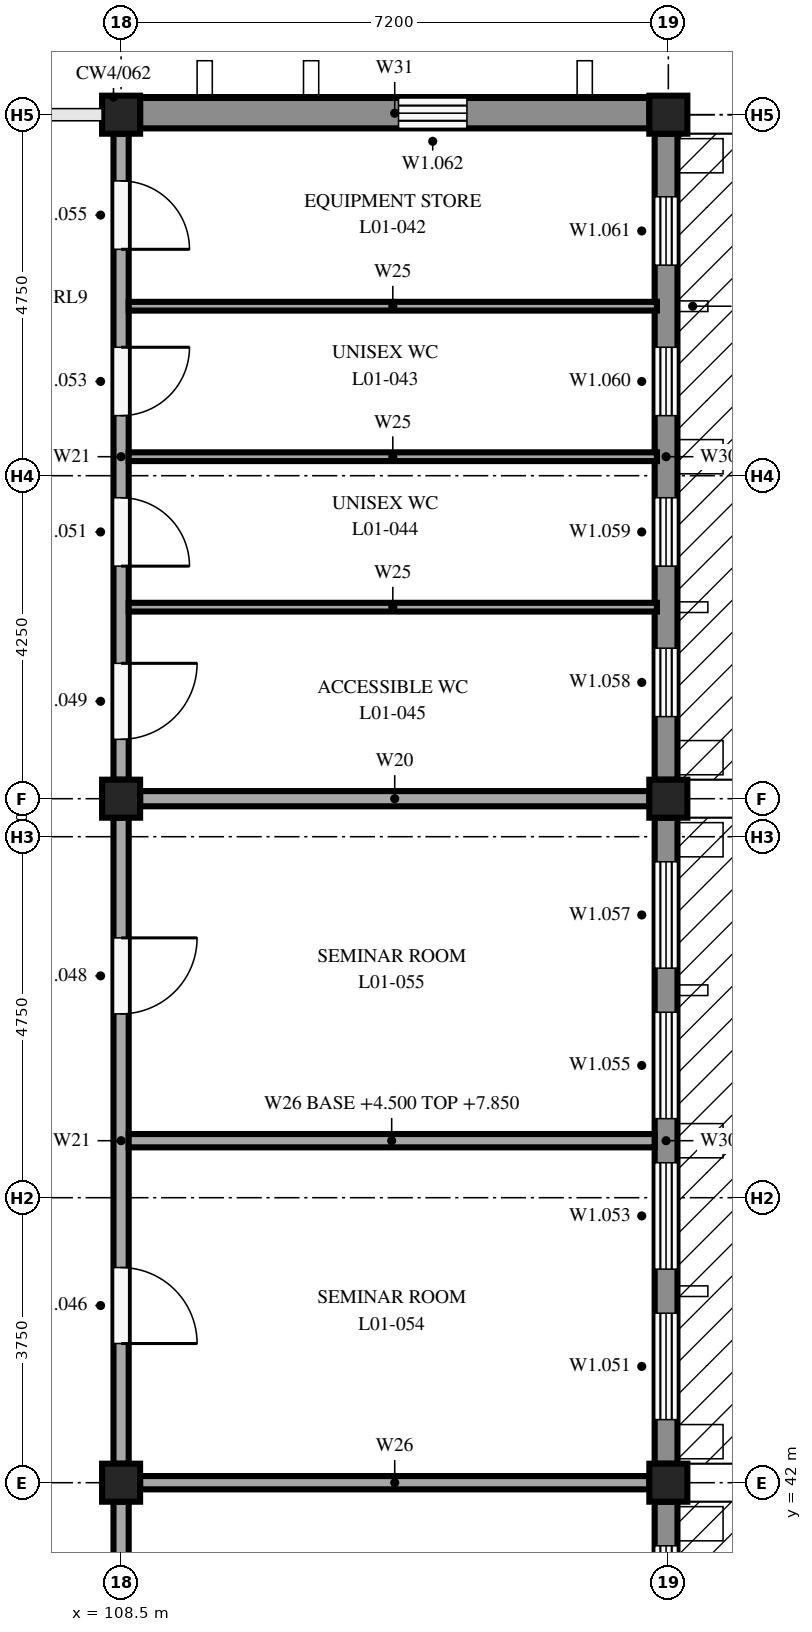
"""IFC4 building model, lengths in metres.
Left out: names, types, materials, properties, quantities, classifications, styles, units other than length and angle.
Written with IfcOpenShell. Run it as: python <this file> out.ifc"""

import sys

from ifc_helpers import new_model, si_unit, direction, frame, frame_2d, origin, origin_2d, place, context, subcontext, project, spatial, rectangle, extrude, element, fill, save


model = new_model("IFC4")
c1 = context("Model", 3, precision=1e-05, world=origin(), true_north=direction((0.0, 1.0)))
c2 = subcontext(c1, "Body", "Model", "MODEL_VIEW")
j1 = project(units=[si_unit("LENGTHUNIT", "METRE"), si_unit("PLANEANGLEUNIT", "RADIAN")], contexts=[c1])
p1 = place(None, origin())
s1 = spatial("IfcSite", under=j1, at=p1, CompositionType="ELEMENT")
p2 = place(p1, origin())
s2 = spatial("IfcBuilding", under=s1, at=p2, CompositionType="ELEMENT")
p3 = place(p2, frame((0.0, 0.0, 4.5)))
s3 = spatial("IfcBuildingStorey", under=s2, at=p3, CompositionType="ELEMENT", Elevation=4.5)
for number, where, z_axis, x_axis in (
    (1, (108.5, 42.0, 0.0), (0.0, 0.0, 1.0), (1.0, 0.0, 0.0)),
    (2, (108.5, 51.0, 0.0), (0.0, 0.0, 1.0), (1.0, 0.0, 0.0)),
    (3, (108.5, 60.0, 0.0), (0.0, 0.0, 1.0), (1.0, 0.0, 0.0)),
    (4, (115.7, 42.0, 0.0), (0.0, 0.0, 1.0), (1.0, 0.0, 0.0)),
    (5, (115.7, 51.0, 0.0), (0.0, 0.0, 1.0), (1.0, 0.0, 0.0)),
    (6, (115.7, 60.0, 0.0), (0.0, 0.0, 1.0), (1.0, 0.0, 0.0)),
):
    element("IfcColumn", number, at=place(p3, frame(where, z_axis=z_axis, x_axis=x_axis)), inside=s3, PredefinedType="COLUMN", context=c2, shape_type="SweptSolid", body=[
        extrude(rectangle(XDim=0.5, YDim=0.5, at=origin_2d()), origin(), (0.0, 0.0, 1.0), 3.35),
    ])
p4 = place(p3, frame((115.67, 41.75, 0.0), z_axis=(0.0, 0.0, 1.0), x_axis=(0.0, -1.0, 0.0)))
e7 = element("IfcWall", 7, at=p4, inside=s3, PredefinedType="STANDARD", context=c2, shape_type="SweptSolid", body=[
    extrude(rectangle(XDim=8.5, YDim=0.3, at=frame_2d((4.25, 0.0))), origin(), (0.0, 0.0, 1.0), 2.85),
])
p5 = place(p4, frame((6.52, 0.0, 0.6)))
e8 = element("IfcOpeningElement", 8, at=p5, cuts=e7, PredefinedType="OPENING", context=c2, shape_type="SweptSolid", body=[
    extrude(rectangle(XDim=1.4, YDim=2.2, at=frame_2d((0.7, 1.1))), frame((0.0, 0.16, 0.0), z_axis=(0.0, -1.0, 0.0), x_axis=(1.0, 0.0, 0.0)), (0.0, 0.0, 1.0), 0.32),
])
p6 = place(p4, frame((4.54, 0.0, 0.6)))
e9 = element("IfcOpeningElement", 9, at=p6, cuts=e7, PredefinedType="OPENING", context=c2, shape_type="SweptSolid", body=[
    extrude(rectangle(XDim=1.4, YDim=2.2, at=frame_2d((0.7, 1.1))), frame((0.0, 0.16, 0.0), z_axis=(0.0, -1.0, 0.0), x_axis=(1.0, 0.0, 0.0)), (0.0, 0.0, 1.0), 0.32),
])
p7 = place(p4, frame((2.56, 0.0, 0.6)))
e10 = element("IfcOpeningElement", 10, at=p7, cuts=e7, PredefinedType="OPENING", context=c2, shape_type="SweptSolid", body=[
    extrude(rectangle(XDim=1.4, YDim=2.2, at=frame_2d((0.7, 1.1))), frame((0.0, 0.16, 0.0), z_axis=(0.0, -1.0, 0.0), x_axis=(1.0, 0.0, 0.0)), (0.0, 0.0, 1.0), 0.32),
])
p8 = place(p4, frame((0.58, 0.0, 0.6)))
e11 = element("IfcOpeningElement", 11, at=p8, cuts=e7, PredefinedType="OPENING", context=c2, shape_type="SweptSolid", body=[
    extrude(rectangle(XDim=1.4, YDim=2.2, at=frame_2d((0.7, 1.1))), frame((0.0, 0.16, 0.0), z_axis=(0.0, -1.0, 0.0), x_axis=(1.0, 0.0, 0.0)), (0.0, 0.0, 1.0), 0.32),
])
p9 = place(p3, frame((115.67, 50.75, 0.0), z_axis=(0.0, 0.0, 1.0), x_axis=(0.0, -1.0, 0.0)))
e12 = element("IfcWall", 12, at=p9, inside=s3, PredefinedType="STANDARD", context=c2, shape_type="SweptSolid", body=[
    extrude(rectangle(XDim=8.5, YDim=0.3, at=frame_2d((4.25, 0.0))), origin(), (0.0, 0.0, 1.0), 2.85),
])
p10 = place(p9, frame((6.52, 0.0, 0.6)))
e13 = element("IfcOpeningElement", 13, at=p10, cuts=e12, PredefinedType="OPENING", context=c2, shape_type="SweptSolid", body=[
    extrude(rectangle(XDim=1.4, YDim=2.2, at=frame_2d((0.7, 1.1))), frame((0.0, 0.16, 0.0), z_axis=(0.0, -1.0, 0.0), x_axis=(1.0, 0.0, 0.0)), (0.0, 0.0, 1.0), 0.32),
])
p11 = place(p9, frame((4.54, 0.0, 0.6)))
e14 = element("IfcOpeningElement", 14, at=p11, cuts=e12, PredefinedType="OPENING", context=c2, shape_type="SweptSolid", body=[
    extrude(rectangle(XDim=1.4, YDim=2.2, at=frame_2d((0.7, 1.1))), frame((0.0, 0.16, 0.0), z_axis=(0.0, -1.0, 0.0), x_axis=(1.0, 0.0, 0.0)), (0.0, 0.0, 1.0), 0.32),
])
p12 = place(p9, frame((2.56, 0.0, 0.6)))
e15 = element("IfcOpeningElement", 15, at=p12, cuts=e12, PredefinedType="OPENING", context=c2, shape_type="SweptSolid", body=[
    extrude(rectangle(XDim=1.4, YDim=2.2, at=frame_2d((0.7, 1.1))), frame((0.0, 0.16, 0.0), z_axis=(0.0, -1.0, 0.0), x_axis=(1.0, 0.0, 0.0)), (0.0, 0.0, 1.0), 0.32),
])
p13 = place(p9, frame((0.58, 0.0, 0.6)))
e16 = element("IfcOpeningElement", 16, at=p13, cuts=e12, PredefinedType="OPENING", context=c2, shape_type="SweptSolid", body=[
    extrude(rectangle(XDim=1.4, YDim=2.2, at=frame_2d((0.7, 1.1))), frame((0.0, 0.16, 0.0), z_axis=(0.0, -1.0, 0.0), x_axis=(1.0, 0.0, 0.0)), (0.0, 0.0, 1.0), 0.32),
])
p14 = place(p3, frame((115.67, 59.75, 0.0), z_axis=(0.0, 0.0, 1.0), x_axis=(0.0, -1.0, 0.0)))
e17 = element("IfcWall", 17, at=p14, inside=s3, PredefinedType="STANDARD", context=c2, shape_type="SweptSolid", body=[
    extrude(rectangle(XDim=8.5, YDim=0.3, at=frame_2d((4.25, 0.0))), origin(), (0.0, 0.0, 1.0), 2.85),
])
p15 = place(p14, frame((6.77, 0.0, 1.6)))
e18 = element("IfcOpeningElement", 18, at=p15, cuts=e17, PredefinedType="OPENING", context=c2, shape_type="SweptSolid", body=[
    extrude(rectangle(XDim=0.9, YDim=1.0, at=frame_2d((0.45, 0.5))), frame((0.0, 0.16, 0.0), z_axis=(0.0, -1.0, 0.0), x_axis=(1.0, 0.0, 0.0)), (0.0, 0.0, 1.0), 0.32),
])
p16 = place(p14, frame((4.79, 0.0, 1.6)))
e19 = element("IfcOpeningElement", 19, at=p16, cuts=e17, PredefinedType="OPENING", context=c2, shape_type="SweptSolid", body=[
    extrude(rectangle(XDim=0.9, YDim=1.0, at=frame_2d((0.45, 0.5))), frame((0.0, 0.16, 0.0), z_axis=(0.0, -1.0, 0.0), x_axis=(1.0, 0.0, 0.0)), (0.0, 0.0, 1.0), 0.32),
])
p17 = place(p14, frame((2.81, 0.0, 1.6)))
e20 = element("IfcOpeningElement", 20, at=p17, cuts=e17, PredefinedType="OPENING", context=c2, shape_type="SweptSolid", body=[
    extrude(rectangle(XDim=0.9, YDim=1.0, at=frame_2d((0.45, 0.5))), frame((0.0, 0.16, 0.0), z_axis=(0.0, -1.0, 0.0), x_axis=(1.0, 0.0, 0.0)), (0.0, 0.0, 1.0), 0.32),
])
p18 = place(p14, frame((0.83, 0.0, 1.6)))
e21 = element("IfcOpeningElement", 21, at=p18, cuts=e17, PredefinedType="OPENING", context=c2, shape_type="SweptSolid", body=[
    extrude(rectangle(XDim=0.9, YDim=1.0, at=frame_2d((0.45, 0.5))), frame((0.0, 0.16, 0.0), z_axis=(0.0, -1.0, 0.0), x_axis=(1.0, 0.0, 0.0)), (0.0, 0.0, 1.0), 0.32),
])
p19 = place(p3, frame((108.75, 60.02, 0.0), z_axis=(0.0, 0.0, 1.0), x_axis=(1.0, 0.0, 0.0)))
e22 = element("IfcWall", 22, at=p19, inside=s3, PredefinedType="STANDARD", context=c2, shape_type="SweptSolid", body=[
    extrude(rectangle(XDim=6.7, YDim=0.4, at=frame_2d((3.35, 0.0))), origin(), (0.0, 0.0, 1.0), 2.9),
])
p20 = place(p19, frame((3.4, 0.0, 1.6)))
e23 = element("IfcOpeningElement", 23, at=p20, cuts=e22, PredefinedType="OPENING", context=c2, shape_type="SweptSolid", body=[
    extrude(rectangle(XDim=0.9, YDim=1.0, at=frame_2d((0.45, 0.5))), frame((0.0, 0.21, 0.0), z_axis=(0.0, -1.0, 0.0), x_axis=(1.0, 0.0, 0.0)), (0.0, 0.0, 1.0), 0.42),
])
p21 = place(p3, frame((108.5, 59.75, 0.0), z_axis=(0.0, 0.0, 1.0), x_axis=(0.0, -1.0, 0.0)))
e24 = element("IfcWall", 24, at=p21, inside=s3, PredefinedType="PARTITIONING", context=c2, shape_type="SweptSolid", body=[
    extrude(rectangle(XDim=8.5, YDim=0.2, at=frame_2d((4.25, 0.0))), origin(), (0.0, 0.0, 1.0), 2.9),
])
p22 = place(p21, frame((6.969, 0.0, 0.0)))
e25 = element("IfcOpeningElement", 25, at=p22, cuts=e24, PredefinedType="OPENING", context=c2, shape_type="SweptSolid", body=[
    extrude(rectangle(XDim=1.0, YDim=2.1, at=frame_2d((0.5, 1.05))), frame((0.0, 0.11, 0.0), z_axis=(0.0, -1.0, 0.0), x_axis=(1.0, 0.0, 0.0)), (0.0, 0.0, 1.0), 0.22),
])
p23 = place(p21, frame((4.79, 0.0, 0.0)))
e26 = element("IfcOpeningElement", 26, at=p23, cuts=e24, PredefinedType="OPENING", context=c2, shape_type="SweptSolid", body=[
    extrude(rectangle(XDim=0.9, YDim=2.1, at=frame_2d((0.45, 1.05))), frame((0.0, 0.11, 0.0), z_axis=(0.0, -1.0, 0.0), x_axis=(1.0, 0.0, 0.0)), (0.0, 0.0, 1.0), 0.22),
])
p24 = place(p21, frame((2.81, 0.0, 0.0)))
e27 = element("IfcOpeningElement", 27, at=p24, cuts=e24, PredefinedType="OPENING", context=c2, shape_type="SweptSolid", body=[
    extrude(rectangle(XDim=0.9, YDim=2.1, at=frame_2d((0.45, 1.05))), frame((0.0, 0.11, 0.0), z_axis=(0.0, -1.0, 0.0), x_axis=(1.0, 0.0, 0.0)), (0.0, 0.0, 1.0), 0.22),
])
p25 = place(p21, frame((0.621, 0.0, 0.0)))
e28 = element("IfcOpeningElement", 28, at=p25, cuts=e24, PredefinedType="OPENING", context=c2, shape_type="SweptSolid", body=[
    extrude(rectangle(XDim=0.9, YDim=2.1, at=frame_2d((0.45, 1.05))), frame((0.0, 0.11, 0.0), z_axis=(0.0, -1.0, 0.0), x_axis=(1.0, 0.0, 0.0)), (0.0, 0.0, 1.0), 0.22),
])
p26 = place(p3, frame((108.75, 51.0, 0.0), z_axis=(0.0, 0.0, 1.0), x_axis=(1.0, 0.0, 0.0)))
e29 = element("IfcWall", 29, at=p26, inside=s3, PredefinedType="PARTITIONING", context=c2, shape_type="SweptSolid", body=[
    extrude(rectangle(XDim=6.7, YDim=0.2, at=frame_2d((3.35, 0.0))), origin(), (0.0, 0.0, 1.0), 2.9),
])
for number, where, z_axis, x_axis in (
    (30, (108.6, 57.48, 0.0), (0.0, 0.0, 1.0), (1.0, 0.0, 0.0)),
    (31, (108.6, 55.5, 0.0), (0.0, 0.0, 1.0), (1.0, 0.0, 0.0)),
    (32, (108.6, 53.52, 0.0), (0.0, 0.0, 1.0), (1.0, 0.0, 0.0)),
):
    element("IfcWall", number, at=place(p3, frame(where, z_axis=z_axis, x_axis=x_axis)), inside=s3, PredefinedType="PARTITIONING", context=c2, shape_type="SweptSolid", body=[
        extrude(rectangle(XDim=6.95, YDim=0.115, at=frame_2d((3.475, 0.0))), origin(), (0.0, 0.0, 1.0), 3.35),
    ])
p27 = place(p3, frame((108.5, 41.75, 0.0), z_axis=(0.0, 0.0, 1.0), x_axis=(0.0, -1.0, 0.0)))
e33 = element("IfcWall", 33, at=p27, inside=s3, PredefinedType="PARTITIONING", context=c2, shape_type="SweptSolid", body=[
    extrude(rectangle(XDim=8.5, YDim=0.2, at=frame_2d((4.25, 0.0))), origin(), (0.0, 0.0, 1.0), 2.9),
])
p28 = place(p27, frame((3.75, 0.0, 0.0)))
e34 = element("IfcOpeningElement", 34, at=p28, cuts=e33, PredefinedType="OPENING", context=c2, shape_type="SweptSolid", body=[
    extrude(rectangle(XDim=1.0, YDim=2.1, at=frame_2d((0.5, 1.05))), frame((0.0, 0.11, 0.0), z_axis=(0.0, -1.0, 0.0), x_axis=(1.0, 0.0, 0.0)), (0.0, 0.0, 1.0), 0.22),
])
p29 = place(p3, frame((108.5, 50.75, 0.0), z_axis=(0.0, 0.0, 1.0), x_axis=(0.0, -1.0, 0.0)))
e35 = element("IfcWall", 35, at=p29, inside=s3, PredefinedType="PARTITIONING", context=c2, shape_type="SweptSolid", body=[
    extrude(rectangle(XDim=8.5, YDim=0.2, at=frame_2d((4.25, 0.0))), origin(), (0.0, 0.0, 1.0), 2.9),
])
p30 = place(p29, frame((5.919, 0.0, 0.0)))
e36 = element("IfcOpeningElement", 36, at=p30, cuts=e35, PredefinedType="OPENING", context=c2, shape_type="SweptSolid", body=[
    extrude(rectangle(XDim=1.0, YDim=2.1, at=frame_2d((0.5, 1.05))), frame((0.0, 0.11, 0.0), z_axis=(0.0, -1.0, 0.0), x_axis=(1.0, 0.0, 0.0)), (0.0, 0.0, 1.0), 0.22),
])
p31 = place(p29, frame((1.581, 0.0, 0.0)))
e37 = element("IfcOpeningElement", 37, at=p31, cuts=e35, PredefinedType="OPENING", context=c2, shape_type="SweptSolid", body=[
    extrude(rectangle(XDim=1.0, YDim=2.1, at=frame_2d((0.5, 1.05))), frame((0.0, 0.11, 0.0), z_axis=(0.0, -1.0, 0.0), x_axis=(1.0, 0.0, 0.0)), (0.0, 0.0, 1.0), 0.22),
])
p32 = place(p3, frame((108.75, 42.0, 0.0), z_axis=(0.0, 0.0, 1.0), x_axis=(1.0, 0.0, 0.0)))
e38 = element("IfcWall", 38, at=p32, inside=s3, PredefinedType="PARTITIONING", context=c2, shape_type="SweptSolid", body=[
    extrude(rectangle(XDim=6.7, YDim=0.175, at=frame_2d((3.35, 0.0))), origin(), (0.0, 0.0, 1.0), 2.9),
])
p33 = place(p3, frame((108.6, 46.5, 0.0), z_axis=(0.0, 0.0, 1.0), x_axis=(1.0, 0.0, 0.0)))
e39 = element("IfcWall", 39, at=p33, inside=s3, PredefinedType="PARTITIONING", context=c2, shape_type="SweptSolid", body=[
    extrude(rectangle(XDim=6.92, YDim=0.175, at=frame_2d((3.46, 0.0))), origin(), (0.0, 0.0, 1.0), 3.35),
])
p34 = place(p8, origin())
e40 = element("IfcWindow", 40, at=p34, inside=s3, PartitioningType="DOUBLE_PANEL_VERTICAL", PredefinedType="WINDOW", context=c2, shape_type="SweptSolid", body=[
    extrude(rectangle(XDim=1.4, YDim=2.2, at=frame_2d((0.7, 1.1))), frame((0.0, 0.03, 0.0), z_axis=(0.0, -1.0, 0.0), x_axis=(1.0, 0.0, 0.0)), (0.0, 0.0, 1.0), 0.06),
])
fill(e11, e40)
p35 = place(p10, origin())
e41 = element("IfcWindow", 41, at=p35, inside=s3, PartitioningType="DOUBLE_PANEL_VERTICAL", PredefinedType="WINDOW", context=c2, shape_type="SweptSolid", body=[
    extrude(rectangle(XDim=1.4, YDim=2.2, at=frame_2d((0.7, 1.1))), frame((0.0, 0.03, 0.0), z_axis=(0.0, -1.0, 0.0), x_axis=(1.0, 0.0, 0.0)), (0.0, 0.0, 1.0), 0.06),
])
fill(e13, e41)
p36 = place(p11, origin())
e42 = element("IfcWindow", 42, at=p36, inside=s3, PartitioningType="DOUBLE_PANEL_VERTICAL", PredefinedType="WINDOW", context=c2, shape_type="SweptSolid", body=[
    extrude(rectangle(XDim=1.4, YDim=2.2, at=frame_2d((0.7, 1.1))), frame((0.0, 0.03, 0.0), z_axis=(0.0, -1.0, 0.0), x_axis=(1.0, 0.0, 0.0)), (0.0, 0.0, 1.0), 0.06),
])
fill(e14, e42)
p37 = place(p12, origin())
e43 = element("IfcWindow", 43, at=p37, inside=s3, PartitioningType="DOUBLE_PANEL_VERTICAL", PredefinedType="WINDOW", context=c2, shape_type="SweptSolid", body=[
    extrude(rectangle(XDim=1.4, YDim=2.2, at=frame_2d((0.7, 1.1))), frame((0.0, 0.03, 0.0), z_axis=(0.0, -1.0, 0.0), x_axis=(1.0, 0.0, 0.0)), (0.0, 0.0, 1.0), 0.06),
])
fill(e15, e43)
p38 = place(p13, origin())
e44 = element("IfcWindow", 44, at=p38, inside=s3, PartitioningType="DOUBLE_PANEL_VERTICAL", PredefinedType="WINDOW", context=c2, shape_type="SweptSolid", body=[
    extrude(rectangle(XDim=1.4, YDim=2.2, at=frame_2d((0.7, 1.1))), frame((0.0, 0.03, 0.0), z_axis=(0.0, -1.0, 0.0), x_axis=(1.0, 0.0, 0.0)), (0.0, 0.0, 1.0), 0.06),
])
fill(e16, e44)
p39 = place(p15, origin())
e45 = element("IfcWindow", 45, at=p39, inside=s3, PartitioningType="SINGLE_PANEL", PredefinedType="WINDOW", context=c2, shape_type="SweptSolid", body=[
    extrude(rectangle(XDim=0.9, YDim=1.0, at=frame_2d((0.45, 0.5))), frame((0.0, 0.03, 0.0), z_axis=(0.0, -1.0, 0.0), x_axis=(1.0, 0.0, 0.0)), (0.0, 0.0, 1.0), 0.06),
])
fill(e18, e45)
p40 = place(p16, origin())
e46 = element("IfcWindow", 46, at=p40, inside=s3, PartitioningType="SINGLE_PANEL", PredefinedType="WINDOW", context=c2, shape_type="SweptSolid", body=[
    extrude(rectangle(XDim=0.9, YDim=1.0, at=frame_2d((0.45, 0.5))), frame((0.0, 0.03, 0.0), z_axis=(0.0, -1.0, 0.0), x_axis=(1.0, 0.0, 0.0)), (0.0, 0.0, 1.0), 0.06),
])
fill(e19, e46)
p41 = place(p17, origin())
e47 = element("IfcWindow", 47, at=p41, inside=s3, PartitioningType="SINGLE_PANEL", PredefinedType="WINDOW", context=c2, shape_type="SweptSolid", body=[
    extrude(rectangle(XDim=0.9, YDim=1.0, at=frame_2d((0.45, 0.5))), frame((0.0, 0.03, 0.0), z_axis=(0.0, -1.0, 0.0), x_axis=(1.0, 0.0, 0.0)), (0.0, 0.0, 1.0), 0.06),
])
fill(e20, e47)
p42 = place(p18, origin())
e48 = element("IfcWindow", 48, at=p42, inside=s3, PartitioningType="SINGLE_PANEL", PredefinedType="WINDOW", context=c2, shape_type="SweptSolid", body=[
    extrude(rectangle(XDim=0.9, YDim=1.0, at=frame_2d((0.45, 0.5))), frame((0.0, 0.03, 0.0), z_axis=(0.0, -1.0, 0.0), x_axis=(1.0, 0.0, 0.0)), (0.0, 0.0, 1.0), 0.06),
])
fill(e21, e48)
p43 = place(p20, origin())
e49 = element("IfcWindow", 49, at=p43, inside=s3, PartitioningType="SINGLE_PANEL", PredefinedType="WINDOW", context=c2, shape_type="SweptSolid", body=[
    extrude(rectangle(XDim=0.9, YDim=1.0, at=frame_2d((0.45, 0.5))), frame((0.0, 0.03, 0.0), z_axis=(0.0, -1.0, 0.0), x_axis=(1.0, 0.0, 0.0)), (0.0, 0.0, 1.0), 0.06),
])
fill(e23, e49)
p44 = place(p22, origin())
e50 = element("IfcDoor", 50, at=p44, inside=s3, OperationType="SINGLE_SWING_LEFT", PredefinedType="DOOR", context=c2, shape_type="SweptSolid", body=[
    extrude(rectangle(XDim=1.0, YDim=2.1, at=frame_2d((0.5, 1.05))), frame((0.0, 0.025, 0.0), z_axis=(0.0, -1.0, 0.0), x_axis=(1.0, 0.0, 0.0)), (0.0, 0.0, 1.0), 0.05),
])
fill(e25, e50)
p45 = place(p23, origin())
e51 = element("IfcDoor", 51, at=p45, inside=s3, OperationType="SINGLE_SWING_RIGHT", PredefinedType="DOOR", context=c2, shape_type="SweptSolid", body=[
    extrude(rectangle(XDim=0.9, YDim=2.1, at=frame_2d((0.45, 1.05))), frame((0.0, 0.025, 0.0), z_axis=(0.0, -1.0, 0.0), x_axis=(1.0, 0.0, 0.0)), (0.0, 0.0, 1.0), 0.05),
])
fill(e26, e51)
p46 = place(p24, origin())
e52 = element("IfcDoor", 52, at=p46, inside=s3, OperationType="SINGLE_SWING_LEFT", PredefinedType="DOOR", context=c2, shape_type="SweptSolid", body=[
    extrude(rectangle(XDim=0.9, YDim=2.1, at=frame_2d((0.45, 1.05))), frame((0.0, 0.025, 0.0), z_axis=(0.0, -1.0, 0.0), x_axis=(1.0, 0.0, 0.0)), (0.0, 0.0, 1.0), 0.05),
])
fill(e27, e52)
p47 = place(p25, origin())
e53 = element("IfcDoor", 53, at=p47, inside=s3, OperationType="SINGLE_SWING_RIGHT", PredefinedType="DOOR", context=c2, shape_type="SweptSolid", body=[
    extrude(rectangle(XDim=0.9, YDim=2.1, at=frame_2d((0.45, 1.05))), frame((0.0, 0.025, 0.0), z_axis=(0.0, -1.0, 0.0), x_axis=(1.0, 0.0, 0.0)), (0.0, 0.0, 1.0), 0.05),
])
fill(e28, e53)
p48 = place(p30, origin())
e54 = element("IfcDoor", 54, at=p48, inside=s3, OperationType="SINGLE_SWING_RIGHT", PredefinedType="DOOR", context=c2, shape_type="SweptSolid", body=[
    extrude(rectangle(XDim=1.0, YDim=2.1, at=frame_2d((0.5, 1.05))), frame((0.0, 0.025, 0.0), z_axis=(0.0, -1.0, 0.0), x_axis=(1.0, 0.0, 0.0)), (0.0, 0.0, 1.0), 0.05),
])
fill(e36, e54)
p49 = place(p31, origin())
e55 = element("IfcDoor", 55, at=p49, inside=s3, OperationType="SINGLE_SWING_LEFT", PredefinedType="DOOR", context=c2, shape_type="SweptSolid", body=[
    extrude(rectangle(XDim=1.0, YDim=2.1, at=frame_2d((0.5, 1.05))), frame((0.0, 0.025, 0.0), z_axis=(0.0, -1.0, 0.0), x_axis=(1.0, 0.0, 0.0)), (0.0, 0.0, 1.0), 0.05),
])
fill(e37, e55)
save(model, sys.argv[1])
